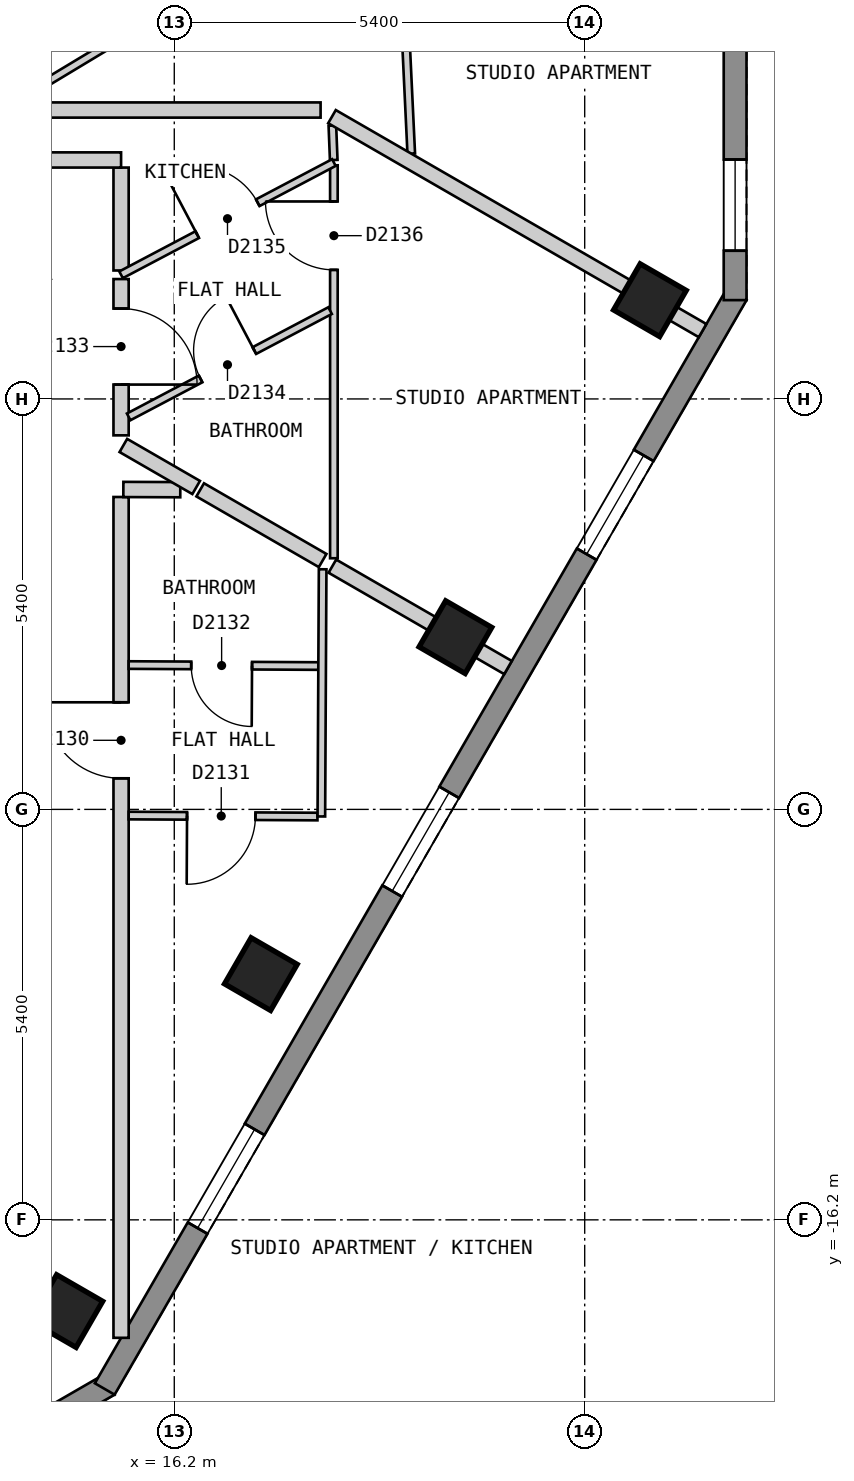
"""IFC4 building model, lengths in metres.
Left out: names, types, materials, properties, quantities, classifications, styles, units other than length and angle.
Written with IfcOpenShell. Run it as: python <this file> out.ifc"""

import sys

from ifc_helpers import new_model, si_unit, direction, frame, frame_2d, origin, origin_2d, place, context, subcontext, project, spatial, polyline, rectangle, outline, extrude, element, fill, save


model = new_model("IFC4")
c1 = context("Model", 3, precision=1e-05, world=origin(), true_north=direction((0.0, 1.0)))
c2 = subcontext(c1, "Body", "Model", "MODEL_VIEW")
j1 = project(units=[si_unit("LENGTHUNIT", "METRE"), si_unit("PLANEANGLEUNIT", "RADIAN")], contexts=[c1])
p1 = place(None, origin())
s1 = spatial("IfcSite", under=j1, at=p1, CompositionType="ELEMENT")
p2 = place(p1, origin())
s2 = spatial("IfcBuilding", under=s1, at=p2, CompositionType="ELEMENT")
p3 = place(p2, frame((0.0, 0.0, 205.8)))
s3 = spatial("IfcBuildingStorey", under=s2, at=p3, CompositionType="ELEMENT", Elevation=205.8)
for number, where, z_axis, x_axis in (
    (1, (14.78, -17.4, 0.0), (0.0, 0.0, 1.0), (0.5, 0.866, 0.0)),
    (2, (17.339, -12.967, 0.0), (0.0, 0.0, 1.0), (0.5, 0.866, 0.0)),
    (3, (19.899, -8.534, 0.0), (0.0, 0.0, 1.0), (0.5, 0.866, 0.0)),
    (4, (22.458, -4.101, 0.0), (0.0, 0.0, 1.0), (0.5, 0.866, 0.0)),
):
    element("IfcColumn", number, at=place(p3, frame(where, z_axis=z_axis, x_axis=x_axis)), inside=s3, PredefinedType="COLUMN", context=c2, shape_type="SweptSolid", body=[
        extrude(rectangle(XDim=0.7, YDim=0.7, at=origin_2d()), origin(), (0.0, 0.0, 1.0), 3.0),
    ])
p4 = place(p3, frame((11.01, -20.87, 0.0), z_axis=(0.0, 0.0, 1.0), x_axis=(0.866022959057, 0.500004234368, 0.0)))
e5 = element("IfcWall", 5, at=p4, inside=s3, PredefinedType="SOLIDWALL", context=c2, shape_type="SweptSolid", body=[
    extrude(outline(polyline([(0.0, -0.15), (5.0, -0.15), (4.92, 0.15), (0.08, 0.15), (0.0, -0.15)])), origin(), (0.0, 0.0, 1.0), 2.7),
])
p5 = place(p4, frame((0.65, 0.0, 0.15)))
e6 = element("IfcOpeningElement", 6, at=p5, cuts=e5, PredefinedType="OPENING", context=c2, shape_type="SweptSolid", body=[
    extrude(rectangle(XDim=1.2, YDim=2.1, at=frame_2d((0.6, 1.05))), frame((0.0, 0.16, 0.0), z_axis=(0.0, -1.0, 0.0), x_axis=(1.0, 0.0, 0.0)), (0.0, 0.0, 1.0), 0.32),
])
p6 = place(p3, frame((15.285, -18.425, 0.0), z_axis=(0.0, 0.0, 1.0), x_axis=(0.500012653391, 0.866018098222, 0.0)))
e7 = element("IfcWall", 7, at=p6, inside=s3, PredefinedType="SOLIDWALL", context=c2, shape_type="SweptSolid", body=[
    extrude(outline(polyline([(0.0, -0.15), (16.628, -0.15), (16.548, 0.15), (0.08, 0.15), (0.0, -0.15)])), origin(), (0.0, 0.0, 1.0), 2.7),
])
p7 = place(p6, frame((2.444, 0.0, 0.15)))
e8 = element("IfcOpeningElement", 8, at=p7, cuts=e7, PredefinedType="OPENING", context=c2, shape_type="SweptSolid", body=[
    extrude(rectangle(XDim=1.5, YDim=2.1, at=frame_2d((0.75, 1.05))), frame((0.0, 0.16, 0.0), z_axis=(0.0, -1.0, 0.0), x_axis=(1.0, 0.0, 0.0)), (0.0, 0.0, 1.0), 0.32),
])
p8 = place(p6, frame((7.564, 0.0, 0.15)))
e9 = element("IfcOpeningElement", 9, at=p8, cuts=e7, PredefinedType="OPENING", context=c2, shape_type="SweptSolid", body=[
    extrude(rectangle(XDim=1.5, YDim=2.1, at=frame_2d((0.75, 1.05))), frame((0.0, 0.16, 0.0), z_axis=(0.0, -1.0, 0.0), x_axis=(1.0, 0.0, 0.0)), (0.0, 0.0, 1.0), 0.32),
])
p9 = place(p6, frame((12.682, 0.0, 0.15)))
e10 = element("IfcOpeningElement", 10, at=p9, cuts=e7, PredefinedType="OPENING", context=c2, shape_type="SweptSolid", body=[
    extrude(rectangle(XDim=1.5, YDim=2.1, at=frame_2d((0.75, 1.05))), frame((0.0, 0.16, 0.0), z_axis=(0.0, -1.0, 0.0), x_axis=(1.0, 0.0, 0.0)), (0.0, 0.0, 1.0), 0.32),
])
p10 = place(p3, frame((23.579, -4.1, 0.0), z_axis=(0.0, 0.0, 1.0), x_axis=(0.0, 1.0, 0.0)))
e11 = element("IfcWall", 11, at=p10, inside=s3, PredefinedType="SOLIDWALL", context=c2, shape_type="SweptSolid", body=[
    extrude(outline(polyline([(0.0, -0.15), (5.0, -0.15), (4.92, 0.15), (0.08, 0.15), (0.0, -0.15)])), origin(), (0.0, 0.0, 1.0), 2.7),
])
p11 = place(p10, frame((0.65, 0.0, 0.15)))
e12 = element("IfcOpeningElement", 12, at=p11, cuts=e11, PredefinedType="OPENING", context=c2, shape_type="SweptSolid", body=[
    extrude(rectangle(XDim=1.2, YDim=2.1, at=frame_2d((0.6, 1.05))), frame((0.0, 0.16, 0.0), z_axis=(0.0, -1.0, 0.0), x_axis=(1.0, 0.0, 0.0)), (0.0, 0.0, 1.0), 0.32),
])
p12 = place(p3, frame((15.5, -2.356, 0.0), z_axis=(0.0, 0.0, 1.0), x_axis=(0.0, -1.0, 0.0)))
e13 = element("IfcWall", 13, at=p12, inside=s3, PredefinedType="PARTITIONING", context=c2, shape_type="SweptSolid", body=[
    extrude(rectangle(XDim=1.354, YDim=0.2, at=frame_2d((0.677, 0.0))), origin(), (0.0, 0.0, 1.0), 2.7),
])
p13 = place(p3, frame((12.902, -2.256, 0.0), z_axis=(0.0, 0.0, 1.0), x_axis=(1.0, 0.0, 0.0)))
e14 = element("IfcWall", 14, at=p13, inside=s3, PredefinedType="PARTITIONING", context=c2, shape_type="SweptSolid", body=[
    extrude(rectangle(XDim=2.598, YDim=0.2, at=frame_2d((1.299, 0.0))), origin(), (0.0, 0.0, 1.0), 2.7),
])
p14 = place(p3, frame((15.5, -17.752, 0.0), z_axis=(0.0, 0.0, 1.0), x_axis=(0.0, 1.0, 0.0)))
e15 = element("IfcWall", 15, at=p14, inside=s3, PredefinedType="PARTITIONING", context=c2, shape_type="SweptSolid", body=[
    extrude(rectangle(XDim=11.062, YDim=0.2, at=frame_2d((5.531, 0.0))), origin(), (0.0, 0.0, 1.0), 2.7),
])
p15 = place(p14, frame((7.361, 0.0, 0.0)))
e16 = element("IfcOpeningElement", 16, at=p15, cuts=e15, PredefinedType="OPENING", context=c2, shape_type="SweptSolid", body=[
    extrude(rectangle(XDim=1.0, YDim=2.1, at=frame_2d((0.5, 1.05))), frame((0.0, 0.11, 0.0), z_axis=(0.0, -1.0, 0.0), x_axis=(1.0, 0.0, 0.0)), (0.0, 0.0, 1.0), 0.22),
])
p16 = place(p3, frame((15.5, -5.879, 0.0), z_axis=(0.0, 0.0, 1.0), x_axis=(0.0, 1.0, 0.0)))
e17 = element("IfcWall", 17, at=p16, inside=s3, PredefinedType="PARTITIONING", context=c2, shape_type="SweptSolid", body=[
    extrude(rectangle(XDim=2.056, YDim=0.2, at=frame_2d((1.028, 0.0))), origin(), (0.0, 0.0, 1.0), 2.7),
])
p17 = place(p16, frame((0.668, 0.0, 0.0)))
e18 = element("IfcOpeningElement", 18, at=p17, cuts=e17, PredefinedType="OPENING", context=c2, shape_type="SweptSolid", body=[
    extrude(rectangle(XDim=1.0, YDim=2.1, at=frame_2d((0.5, 1.05))), frame((0.0, 0.11, 0.0), z_axis=(0.0, -1.0, 0.0), x_axis=(1.0, 0.0, 0.0)), (0.0, 0.0, 1.0), 0.22),
])
p18 = place(p3, frame((15.6, -8.901, 0.0), z_axis=(0.0, 0.0, 1.0), x_axis=(0.999986038514, -0.005284200615, 0.0)))
e19 = element("IfcWall", 19, at=p18, inside=s3, PredefinedType="PARTITIONING", context=c2, shape_type="SweptSolid", body=[
    extrude(rectangle(XDim=2.495, YDim=0.1, at=frame_2d((1.248, 0.0))), origin(), (0.0, 0.0, 1.0), 2.7),
])
p19 = place(p18, frame((0.823, 0.0, 0.0)))
e20 = element("IfcOpeningElement", 20, at=p19, cuts=e19, PredefinedType="OPENING", context=c2, shape_type="SweptSolid", body=[
    extrude(rectangle(XDim=0.8, YDim=2.1, at=frame_2d((0.4, 1.05))), frame((0.0, 0.06, 0.0), z_axis=(0.0, -1.0, 0.0), x_axis=(1.0, 0.0, 0.0)), (0.0, 0.0, 1.0), 0.12),
])
p20 = place(p3, frame((15.6, -10.881, 0.0), z_axis=(0.0, 0.0, 1.0), x_axis=(0.999986431575, -0.005209286502, 0.0)))
e21 = element("IfcWall", 21, at=p20, inside=s3, PredefinedType="PARTITIONING", context=c2, shape_type="SweptSolid", body=[
    extrude(rectangle(XDim=2.484, YDim=0.1, at=frame_2d((1.242, 0.0))), origin(), (0.0, 0.0, 1.0), 2.7),
])
p21 = place(p20, frame((0.768, 0.0, 0.0)))
e22 = element("IfcOpeningElement", 22, at=p21, cuts=e21, PredefinedType="OPENING", context=c2, shape_type="SweptSolid", body=[
    extrude(rectangle(XDim=0.9, YDim=2.1, at=frame_2d((0.45, 1.05))), frame((0.0, 0.06, 0.0), z_axis=(0.0, -1.0, 0.0), x_axis=(1.0, 0.0, 0.0)), (0.0, 0.0, 1.0), 0.12),
])
p22 = place(p3, frame((18.28, -1.804, 0.0), z_axis=(0.0, 0.0, 1.0), x_axis=(0.039839036731, -0.999206110446, 0.0)))
e23 = element("IfcWall", 23, at=p22, inside=s3, PredefinedType="PARTITIONING", context=c2, shape_type="SweptSolid", body=[
    extrude(rectangle(XDim=0.453, YDim=0.1, at=frame_2d((0.227, 0.0))), origin(), (0.0, 0.0, 1.0), 2.7),
])
p23 = place(p3, frame((19.151, 1.343, 0.0), z_axis=(0.0, 0.0, 1.0), x_axis=(0.047509130714, -0.998870803707, 0.0)))
e24 = element("IfcWall", 24, at=p23, inside=s3, PredefinedType="PARTITIONING", context=c2, shape_type="SweptSolid", body=[
    extrude(rectangle(XDim=3.52, YDim=0.1, at=frame_2d((1.76, 0.0))), origin(), (0.0, 0.0, 1.0), 2.7),
])
p24 = place(p3, frame((18.135, -10.893, 0.0), z_axis=(0.0, 0.0, 1.0), x_axis=(0.005255182688, 0.999986191432, 0.0)))
e25 = element("IfcWall", 25, at=p24, inside=s3, PredefinedType="PARTITIONING", context=c2, shape_type="SweptSolid", body=[
    extrude(rectangle(XDim=3.252, YDim=0.1, at=frame_2d((1.626, 0.0))), origin(), (0.0, 0.0, 1.0), 2.7),
])
p25 = place(p3, frame((18.3, -7.496, 0.0), z_axis=(0.0, 0.0, 1.0), x_axis=(0.0, 1.0, 0.0)))
e26 = element("IfcWall", 26, at=p25, inside=s3, PredefinedType="PARTITIONING", context=c2, shape_type="SweptSolid", body=[
    extrude(rectangle(XDim=5.17, YDim=0.1, at=frame_2d((2.585, 0.0))), origin(), (0.0, 0.0, 1.0), 2.7),
])
p26 = place(p25, frame((3.794, 0.0, 0.0)))
e27 = element("IfcOpeningElement", 27, at=p26, cuts=e26, PredefinedType="OPENING", context=c2, shape_type="SweptSolid", body=[
    extrude(rectangle(XDim=0.9, YDim=2.1, at=frame_2d((0.45, 1.05))), frame((0.0, 0.06, 0.0), z_axis=(0.0, -1.0, 0.0), x_axis=(1.0, 0.0, 0.0)), (0.0, 0.0, 1.0), 0.12),
])
p27 = place(p3, frame((15.5, -3.767, 0.0), z_axis=(0.0, 0.0, 1.0), x_axis=(0.884482889541, 0.466572628976, 0.0)))
e28 = element("IfcWall", 28, at=p27, inside=s3, PredefinedType="PARTITIONING", context=c2, shape_type="SweptSolid", body=[
    extrude(rectangle(XDim=3.166, YDim=0.1, at=frame_2d((1.583, 0.0))), origin(), (0.0, 0.0, 1.0), 2.7),
])
p28 = place(p27, frame((1.133, 0.0, 0.0)))
e29 = element("IfcOpeningElement", 29, at=p28, cuts=e28, PredefinedType="OPENING", context=c2, shape_type="SweptSolid", body=[
    extrude(rectangle(XDim=0.9, YDim=2.1, at=frame_2d((0.45, 1.05))), frame((0.0, 0.06, 0.0), z_axis=(0.0, -1.0, 0.0), x_axis=(1.0, 0.0, 0.0)), (0.0, 0.0, 1.0), 0.12),
])
p29 = place(p3, frame((15.6, -5.636, 0.0), z_axis=(0.0, 0.0, 1.0), x_axis=(0.884468832747, 0.466599275503, 0.0)))
e30 = element("IfcWall", 30, at=p29, inside=s3, PredefinedType="PARTITIONING", context=c2, shape_type="SweptSolid", body=[
    extrude(rectangle(XDim=2.996, YDim=0.1, at=frame_2d((1.498, 0.0))), origin(), (0.0, 0.0, 1.0), 2.7),
])
p30 = place(p29, frame((1.07, 0.0, 0.0)))
e31 = element("IfcOpeningElement", 31, at=p30, cuts=e30, PredefinedType="OPENING", context=c2, shape_type="SweptSolid", body=[
    extrude(rectangle(XDim=0.8, YDim=2.1, at=frame_2d((0.4, 1.05))), frame((0.0, 0.06, 0.0), z_axis=(0.0, -1.0, 0.0), x_axis=(1.0, 0.0, 0.0)), (0.0, 0.0, 1.0), 0.12),
])
p31 = place(p3, frame((14.081, -1.499, 0.0), z_axis=(0.0, 0.0, 1.0), x_axis=(0.85652273816, 0.516109289798, 0.0)))
e32 = element("IfcWall", 32, at=p31, inside=s3, PredefinedType="PARTITIONING", context=c2, shape_type="SweptSolid", body=[
    extrude(rectangle(XDim=5.537, YDim=0.1, at=frame_2d((2.769, 0.0))), origin(), (0.0, 0.0, 1.0), 2.7),
])
p32 = place(p31, frame((2.267, 0.0, 0.0)))
e33 = element("IfcOpeningElement", 33, at=p32, cuts=e32, PredefinedType="OPENING", context=c2, shape_type="SweptSolid", body=[
    extrude(rectangle(XDim=0.9, YDim=2.1, at=frame_2d((0.45, 1.05))), frame((0.0, 0.06, 0.0), z_axis=(0.0, -1.0, 0.0), x_axis=(1.0, 0.0, 0.0)), (0.0, 0.0, 1.0), 0.12),
])
p33 = place(p3, frame((15.53, -6.591, 0.0), z_axis=(0.0, 0.0, 1.0), x_axis=(0.999992350786, -0.003911312976, 0.0)))
e34 = element("IfcWall", 34, at=p33, inside=s3, PredefinedType="PARTITIONING", context=c2, shape_type="SweptSolid", body=[
    extrude(rectangle(XDim=0.749, YDim=0.2, at=frame_2d((0.375, 0.0))), origin(), (0.0, 0.0, 1.0), 2.7),
])
p34 = place(p3, frame((18.275, -1.686, 0.0), z_axis=(0.0, 0.0, 1.0), x_axis=(0.866041167766, -0.49997269499, 0.0)))
e35 = element("IfcWall", 35, at=p34, inside=s3, PredefinedType="PARTITIONING", context=c2, shape_type="SweptSolid", body=[
    extrude(rectangle(XDim=5.63, YDim=0.2, at=frame_2d((2.815, 0.0))), origin(), (0.0, 0.0, 1.0), 2.7),
])
p35 = place(p3, frame((15.53, -6.012, 0.0), z_axis=(0.0, 0.0, 1.0), x_axis=(0.866075331272, -0.499913513082, 0.0)))
e36 = element("IfcWall", 36, at=p35, inside=s3, PredefinedType="PARTITIONING", context=c2, shape_type="SweptSolid", body=[
    extrude(rectangle(XDim=1.106, YDim=0.2, at=frame_2d((0.553, 0.0))), origin(), (0.0, 0.0, 1.0), 2.7),
])
p36 = place(p3, frame((16.541, -6.596, 0.0), z_axis=(0.0, 0.0, 1.0), x_axis=(0.866078502609, -0.499908018857, 0.0)))
e37 = element("IfcWall", 37, at=p36, inside=s3, PredefinedType="PARTITIONING", context=c2, shape_type="SweptSolid", body=[
    extrude(rectangle(XDim=1.86, YDim=0.2, at=frame_2d((0.93, 0.0))), origin(), (0.0, 0.0, 1.0), 2.7),
])
p37 = place(p3, frame((18.28, -7.6, 0.0), z_axis=(0.0, 0.0, 1.0), x_axis=(0.866072847874, -0.499917815422, 0.0)))
e38 = element("IfcWall", 38, at=p37, inside=s3, PredefinedType="PARTITIONING", context=c2, shape_type="SweptSolid", body=[
    extrude(rectangle(XDim=2.668, YDim=0.2, at=frame_2d((1.334, 0.0))), origin(), (0.0, 0.0, 1.0), 2.7),
])
p38 = place(p3, frame((13.163, -1.599, 0.0), z_axis=(0.0, 0.0, 1.0), x_axis=(1.0, 0.0, 0.0)))
e39 = element("IfcWall", 39, at=p38, inside=s3, PredefinedType="PARTITIONING", context=c2, shape_type="SweptSolid", body=[
    extrude(rectangle(XDim=4.962, YDim=0.2, at=frame_2d((2.481, 0.0))), origin(), (0.0, 0.0, 1.0), 2.7),
])
p39 = place(p7, origin())
e40 = element("IfcWindow", 40, at=p39, inside=s3, PartitioningType="SINGLE_PANEL", PredefinedType="WINDOW", context=c2, shape_type="SweptSolid", body=[
    extrude(rectangle(XDim=1.5, YDim=2.1, at=frame_2d((0.75, 1.05))), frame((0.0, 0.03, 0.0), z_axis=(0.0, -1.0, 0.0), x_axis=(1.0, 0.0, 0.0)), (0.0, 0.0, 1.0), 0.06),
])
fill(e8, e40)
p40 = place(p8, origin())
e41 = element("IfcWindow", 41, at=p40, inside=s3, PartitioningType="SINGLE_PANEL", PredefinedType="WINDOW", context=c2, shape_type="SweptSolid", body=[
    extrude(rectangle(XDim=1.5, YDim=2.1, at=frame_2d((0.75, 1.05))), frame((0.0, 0.03, 0.0), z_axis=(0.0, -1.0, 0.0), x_axis=(1.0, 0.0, 0.0)), (0.0, 0.0, 1.0), 0.06),
])
fill(e9, e41)
p41 = place(p9, origin())
e42 = element("IfcWindow", 42, at=p41, inside=s3, PartitioningType="SINGLE_PANEL", PredefinedType="WINDOW", context=c2, shape_type="SweptSolid", body=[
    extrude(rectangle(XDim=1.5, YDim=2.1, at=frame_2d((0.75, 1.05))), frame((0.0, 0.03, 0.0), z_axis=(0.0, -1.0, 0.0), x_axis=(1.0, 0.0, 0.0)), (0.0, 0.0, 1.0), 0.06),
])
fill(e10, e42)
p42 = place(p11, origin())
e43 = element("IfcWindow", 43, at=p42, inside=s3, PartitioningType="SINGLE_PANEL", PredefinedType="WINDOW", context=c2, shape_type="SweptSolid", body=[
    extrude(rectangle(XDim=1.2, YDim=2.1, at=frame_2d((0.6, 1.05))), frame((0.0, 0.03, 0.0), z_axis=(0.0, -1.0, 0.0), x_axis=(1.0, 0.0, 0.0)), (0.0, 0.0, 1.0), 0.06),
])
fill(e12, e43)
p43 = place(p15, origin())
e44 = element("IfcDoor", 44, at=p43, inside=s3, OperationType="SINGLE_SWING_RIGHT", PredefinedType="DOOR", context=c2, shape_type="SweptSolid", body=[
    extrude(rectangle(XDim=1.0, YDim=2.1, at=frame_2d((0.5, 1.05))), frame((0.0, 0.025, 0.0), z_axis=(0.0, -1.0, 0.0), x_axis=(1.0, 0.0, 0.0)), (0.0, 0.0, 1.0), 0.05),
])
fill(e16, e44)
p44 = place(p21, origin())
e45 = element("IfcDoor", 45, at=p44, inside=s3, OperationType="SINGLE_SWING_LEFT", PredefinedType="DOOR", context=c2, shape_type="SweptSolid", body=[
    extrude(rectangle(XDim=0.9, YDim=2.1, at=frame_2d((0.45, 1.05))), frame((0.0, 0.025, 0.0), z_axis=(0.0, -1.0, 0.0), x_axis=(1.0, 0.0, 0.0)), (0.0, 0.0, 1.0), 0.05),
])
fill(e22, e45)
p45 = place(p19, origin())
e46 = element("IfcDoor", 46, at=p45, inside=s3, OperationType="SINGLE_SWING_RIGHT", PredefinedType="DOOR", context=c2, shape_type="SweptSolid", body=[
    extrude(rectangle(XDim=0.8, YDim=2.1, at=frame_2d((0.4, 1.05))), frame((0.0, 0.025, 0.0), z_axis=(0.0, -1.0, 0.0), x_axis=(1.0, 0.0, 0.0)), (0.0, 0.0, 1.0), 0.05),
])
fill(e20, e46)
p46 = place(p17, origin())
e47 = element("IfcDoor", 47, at=p46, inside=s3, OperationType="SINGLE_SWING_LEFT", PredefinedType="DOOR", context=c2, shape_type="SweptSolid", body=[
    extrude(rectangle(XDim=1.0, YDim=2.1, at=frame_2d((0.5, 1.05))), frame((0.0, 0.025, 0.0), z_axis=(0.0, -1.0, 0.0), x_axis=(1.0, 0.0, 0.0)), (0.0, 0.0, 1.0), 0.05),
])
fill(e18, e47)
p47 = place(p30, origin())
e48 = element("IfcDoor", 48, at=p47, inside=s3, OperationType="SINGLE_SWING_RIGHT", PredefinedType="DOOR", context=c2, shape_type="SweptSolid", body=[
    extrude(rectangle(XDim=0.8, YDim=2.1, at=frame_2d((0.4, 1.05))), frame((0.0, 0.025, 0.0), z_axis=(0.0, -1.0, 0.0), x_axis=(1.0, 0.0, 0.0)), (0.0, 0.0, 1.0), 0.05),
])
fill(e31, e48)
p48 = place(p28, origin())
e49 = element("IfcDoor", 49, at=p48, inside=s3, OperationType="SINGLE_SWING_LEFT", PredefinedType="DOOR", context=c2, shape_type="SweptSolid", body=[
    extrude(rectangle(XDim=0.9, YDim=2.1, at=frame_2d((0.45, 1.05))), frame((0.0, 0.025, 0.0), z_axis=(0.0, -1.0, 0.0), x_axis=(1.0, 0.0, 0.0)), (0.0, 0.0, 1.0), 0.05),
])
fill(e29, e49)
p49 = place(p26, origin())
e50 = element("IfcDoor", 50, at=p49, inside=s3, OperationType="SINGLE_SWING_RIGHT", PredefinedType="DOOR", context=c2, shape_type="SweptSolid", body=[
    extrude(rectangle(XDim=0.9, YDim=2.1, at=frame_2d((0.45, 1.05))), frame((0.0, 0.025, 0.0), z_axis=(0.0, -1.0, 0.0), x_axis=(1.0, 0.0, 0.0)), (0.0, 0.0, 1.0), 0.05),
])
fill(e27, e50)
save(model, sys.argv[1])
